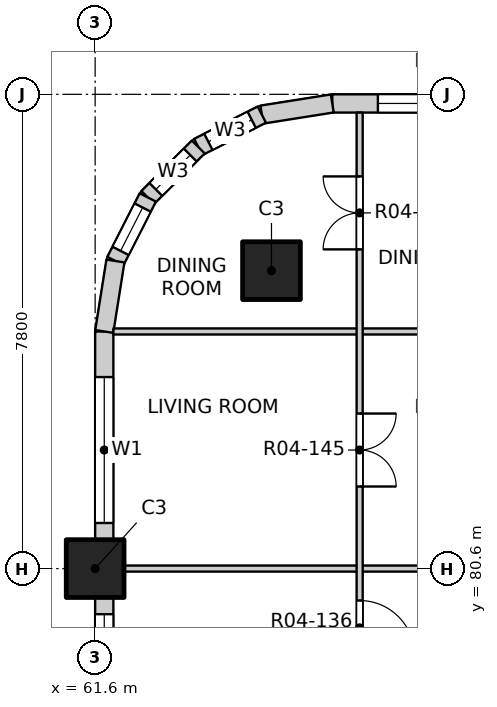
"""IFC4 building model, lengths in metres.
Left out: names, types, materials, properties, quantities, classifications, styles, units other than length and angle.
Written with IfcOpenShell. Run it as: python <this file> out.ifc"""

import sys

from ifc_helpers import new_model, si_unit, direction, frame, frame_2d, origin, origin_2d, place, context, subcontext, project, spatial, rectangle, extrude, element, fill, save


model = new_model("IFC4")
c1 = context("Model", 3, precision=1e-05, world=origin(), true_north=direction((0.0, 1.0)))
c2 = subcontext(c1, "Body", "Model", "MODEL_VIEW")
j1 = project(units=[si_unit("LENGTHUNIT", "METRE"), si_unit("PLANEANGLEUNIT", "RADIAN")], contexts=[c1])
p1 = place(None, origin())
s1 = spatial("IfcSite", under=j1, at=p1, CompositionType="ELEMENT")
p2 = place(p1, origin())
s2 = spatial("IfcBuilding", under=s1, at=p2, CompositionType="ELEMENT")
p3 = place(p2, frame((0.0, 0.0, 58.0)))
s3 = spatial("IfcBuildingStorey", under=s2, at=p3, CompositionType="ELEMENT", Elevation=58.0)
for number, where, z_axis, x_axis in (
    (1, (64.5, 85.5, -0.25), (0.0, 0.0, 1.0), (1.0, 0.0, 0.0)),
    (2, (61.6, 80.6, -0.25), (0.0, 0.0, 1.0), (1.0, 0.0, 0.0)),
):
    element("IfcColumn", number, at=place(p3, frame(where, z_axis=z_axis, x_axis=x_axis)), inside=s3, PredefinedType="COLUMN", context=c2, shape_type="SweptSolid", body=[
        extrude(rectangle(XDim=0.95, YDim=0.95, at=origin_2d()), origin(), (0.0, 0.0, 1.0), 3.4),
    ])
p4 = place(p3, frame((65.5, 88.25, 0.0), z_axis=(0.0, 0.0, 1.0), x_axis=(1.0, 0.0, 0.0)))
e3 = element("IfcWall", 3, at=p4, inside=s3, PredefinedType="SOLIDWALL", context=c2, shape_type="SweptSolid", body=[
    extrude(rectangle(XDim=3.425, YDim=0.3, at=frame_2d((1.712, 0.0))), origin(), (0.0, 0.0, 1.0), 2.7),
])
p5 = place(p4, frame((0.75, 0.0, 0.9)))
e4 = element("IfcOpeningElement", 4, at=p5, cuts=e3, PredefinedType="OPENING", context=c2, shape_type="SweptSolid", body=[
    extrude(rectangle(XDim=2.4, YDim=1.8, at=frame_2d((1.2, 0.9))), frame((0.0, 0.16, 0.0), z_axis=(0.0, -1.0, 0.0), x_axis=(1.0, 0.0, 0.0)), (0.0, 0.0, 1.0), 0.32),
])
p6 = place(p3, frame((61.75, 73.275, 0.0), z_axis=(0.0, 0.0, 1.0), x_axis=(0.0, 1.0, 0.0)))
e5 = element("IfcWall", 5, at=p6, inside=s3, PredefinedType="SOLIDWALL", context=c2, shape_type="SweptSolid", body=[
    extrude(rectangle(XDim=6.85, YDim=0.3, at=frame_2d((3.425, 0.0))), origin(), (0.0, 0.0, 1.0), 2.7),
])
p7 = place(p6, frame((0.275, 0.0, 0.9)))
e6 = element("IfcOpeningElement", 6, at=p7, cuts=e5, PredefinedType="OPENING", context=c2, shape_type="SweptSolid", body=[
    extrude(rectangle(XDim=2.4, YDim=1.8, at=frame_2d((1.2, 0.9))), frame((0.0, 0.16, 0.0), z_axis=(0.0, -1.0, 0.0), x_axis=(1.0, 0.0, 0.0)), (0.0, 0.0, 1.0), 0.32),
])
p8 = place(p6, frame((4.175, 0.0, 0.9)))
e7 = element("IfcOpeningElement", 7, at=p8, cuts=e5, PredefinedType="OPENING", context=c2, shape_type="SweptSolid", body=[
    extrude(rectangle(XDim=2.4, YDim=1.8, at=frame_2d((1.2, 0.9))), frame((0.0, 0.16, 0.0), z_axis=(0.0, -1.0, 0.0), x_axis=(1.0, 0.0, 0.0)), (0.0, 0.0, 1.0), 0.32),
])
p9 = place(p3, frame((61.75, 81.075, 0.0), z_axis=(0.0, 0.0, 1.0), x_axis=(0.0, 1.0, 0.0)))
e8 = element("IfcWall", 8, at=p9, inside=s3, PredefinedType="SOLIDWALL", context=c2, shape_type="SweptSolid", body=[
    extrude(rectangle(XDim=3.425, YDim=0.3, at=frame_2d((1.712, 0.0))), origin(), (0.0, 0.0, 1.0), 2.7),
])
p10 = place(p9, frame((0.275, 0.0, 0.9)))
e9 = element("IfcOpeningElement", 9, at=p10, cuts=e8, PredefinedType="OPENING", context=c2, shape_type="SweptSolid", body=[
    extrude(rectangle(XDim=2.4, YDim=1.8, at=frame_2d((1.2, 0.9))), frame((0.0, 0.16, 0.0), z_axis=(0.0, -1.0, 0.0), x_axis=(1.0, 0.0, 0.0)), (0.0, 0.0, 1.0), 0.32),
])
p11 = place(p3, frame((65.5, 88.25, 0.0), z_axis=(0.0, 0.0, 1.0), x_axis=(-0.987678452879, -0.156496880861, 0.0)))
e10 = element("IfcWall", 10, at=p11, inside=s3, PredefinedType="SOLIDWALL", context=c2, shape_type="SweptSolid", body=[
    extrude(rectangle(XDim=1.173, YDim=0.3, at=frame_2d((0.586, 0.0))), origin(), (0.0, 0.0, 1.0), 2.7),
])
p12 = place(p3, frame((64.341, 88.066, 0.0), z_axis=(0.0, 0.0, 1.0), x_axis=(-0.890988677504, -0.454025524128, 0.0)))
e11 = element("IfcWall", 11, at=p12, inside=s3, PredefinedType="SOLIDWALL", context=c2, shape_type="SweptSolid", body=[
    extrude(rectangle(XDim=1.173, YDim=0.3, at=frame_2d((0.587, 0.0))), origin(), (0.0, 0.0, 1.0), 2.7),
])
p13 = place(p12, frame((0.187, 0.0, 0.9)))
e12 = element("IfcOpeningElement", 12, at=p13, cuts=e11, PredefinedType="OPENING", context=c2, shape_type="SweptSolid", body=[
    extrude(rectangle(XDim=0.8, YDim=1.2, at=frame_2d((0.4, 0.6))), frame((0.0, 0.16, 0.0), z_axis=(0.0, -1.0, 0.0), x_axis=(1.0, 0.0, 0.0)), (0.0, 0.0, 1.0), 0.32),
])
p14 = place(p3, frame((63.296, 87.534, 0.0), z_axis=(0.0, 0.0, 1.0), x_axis=(-0.707106781187, -0.707106781187, 0.0)))
e13 = element("IfcWall", 13, at=p14, inside=s3, PredefinedType="SOLIDWALL", context=c2, shape_type="SweptSolid", body=[
    extrude(rectangle(XDim=1.173, YDim=0.3, at=frame_2d((0.586, 0.0))), origin(), (0.0, 0.0, 1.0), 2.7),
])
p15 = place(p14, frame((0.187, 0.0, 0.9)))
e14 = element("IfcOpeningElement", 14, at=p15, cuts=e13, PredefinedType="OPENING", context=c2, shape_type="SweptSolid", body=[
    extrude(rectangle(XDim=0.8, YDim=1.2, at=frame_2d((0.4, 0.6))), frame((0.0, 0.16, 0.0), z_axis=(0.0, -1.0, 0.0), x_axis=(1.0, 0.0, 0.0)), (0.0, 0.0, 1.0), 0.32),
])
p16 = place(p3, frame((62.466, 86.704, 0.0), z_axis=(0.0, 0.0, 1.0), x_axis=(-0.454025524128, -0.890988677504, 0.0)))
e15 = element("IfcWall", 15, at=p16, inside=s3, PredefinedType="SOLIDWALL", context=c2, shape_type="SweptSolid", body=[
    extrude(rectangle(XDim=1.173, YDim=0.3, at=frame_2d((0.587, 0.0))), origin(), (0.0, 0.0, 1.0), 2.7),
])
p17 = place(p16, frame((0.187, 0.0, 0.9)))
e16 = element("IfcOpeningElement", 16, at=p17, cuts=e15, PredefinedType="OPENING", context=c2, shape_type="SweptSolid", body=[
    extrude(rectangle(XDim=0.8, YDim=1.2, at=frame_2d((0.4, 0.6))), frame((0.0, 0.16, 0.0), z_axis=(0.0, -1.0, 0.0), x_axis=(1.0, 0.0, 0.0)), (0.0, 0.0, 1.0), 0.32),
])
p18 = place(p3, frame((61.934, 85.659, 0.0), z_axis=(0.0, 0.0, 1.0), x_axis=(-0.156496880861, -0.987678452879, 0.0)))
e17 = element("IfcWall", 17, at=p18, inside=s3, PredefinedType="SOLIDWALL", context=c2, shape_type="SweptSolid", body=[
    extrude(rectangle(XDim=1.173, YDim=0.3, at=frame_2d((0.586, 0.0))), origin(), (0.0, 0.0, 1.0), 2.7),
])
p19 = place(p3, frame((61.9, 80.6, 0.0), z_axis=(0.0, 0.0, 1.0), x_axis=(1.0, 0.0, 0.0)))
e18 = element("IfcWall", 18, at=p19, inside=s3, PredefinedType="PARTITIONING", context=c2, shape_type="SweptSolid", body=[
    extrude(rectangle(XDim=7.55, YDim=0.1, at=frame_2d((3.775, 0.0))), origin(), (0.0, 0.0, 1.0), 2.55),
])
p20 = place(p3, frame((61.9, 84.5, 0.0), z_axis=(0.0, 0.0, 1.0), x_axis=(1.0, 0.0, 0.0)))
e19 = element("IfcWall", 19, at=p20, inside=s3, PredefinedType="PARTITIONING", context=c2, shape_type="SweptSolid", body=[
    extrude(rectangle(XDim=11.5, YDim=0.1, at=frame_2d((5.75, 0.0))), origin(), (0.0, 0.0, 1.0), 3.15),
])
p21 = place(p20, frame((7.965, 0.0, 0.0)))
e20 = element("IfcOpeningElement", 20, at=p21, cuts=e19, PredefinedType="OPENING", context=c2, shape_type="SweptSolid", body=[
    extrude(rectangle(XDim=0.9, YDim=2.1, at=frame_2d((0.45, 1.05))), frame((0.0, 0.06, 0.0), z_axis=(0.0, -1.0, 0.0), x_axis=(1.0, 0.0, 0.0)), (0.0, 0.0, 1.0), 0.12),
])
p22 = place(p3, frame((65.95, 76.8, 0.0), z_axis=(0.0, 0.0, 1.0), x_axis=(0.0, 1.0, 0.0)))
e21 = element("IfcWall", 21, at=p22, inside=s3, PredefinedType="PARTITIONING", context=c2, shape_type="SweptSolid", body=[
    extrude(rectangle(XDim=11.3, YDim=0.1, at=frame_2d((5.65, 0.0))), origin(), (0.0, 0.0, 1.0), 3.15),
])
p23 = place(p22, frame((0.425, 0.0, 0.0)))
e22 = element("IfcOpeningElement", 22, at=p23, cuts=e21, PredefinedType="OPENING", context=c2, shape_type="SweptSolid", body=[
    extrude(rectangle(XDim=0.9, YDim=2.1, at=frame_2d((0.45, 1.05))), frame((0.0, 0.06, 0.0), z_axis=(0.0, -1.0, 0.0), x_axis=(1.0, 0.0, 0.0)), (0.0, 0.0, 1.0), 0.12),
])
p24 = place(p22, frame((2.375, 0.0, 0.0)))
e23 = element("IfcOpeningElement", 23, at=p24, cuts=e21, PredefinedType="OPENING", context=c2, shape_type="SweptSolid", body=[
    extrude(rectangle(XDim=0.9, YDim=2.1, at=frame_2d((0.45, 1.05))), frame((0.0, 0.06, 0.0), z_axis=(0.0, -1.0, 0.0), x_axis=(1.0, 0.0, 0.0)), (0.0, 0.0, 1.0), 0.12),
])
p25 = place(p22, frame((5.15, 0.0, 0.0)))
e24 = element("IfcOpeningElement", 24, at=p25, cuts=e21, PredefinedType="OPENING", context=c2, shape_type="SweptSolid", body=[
    extrude(rectangle(XDim=1.2, YDim=2.1, at=frame_2d((0.6, 1.05))), frame((0.0, 0.06, 0.0), z_axis=(0.0, -1.0, 0.0), x_axis=(1.0, 0.0, 0.0)), (0.0, 0.0, 1.0), 0.12),
])
p26 = place(p22, frame((9.05, 0.0, 0.0)))
e25 = element("IfcOpeningElement", 25, at=p26, cuts=e21, PredefinedType="OPENING", context=c2, shape_type="SweptSolid", body=[
    extrude(rectangle(XDim=1.2, YDim=2.1, at=frame_2d((0.6, 1.05))), frame((0.0, 0.06, 0.0), z_axis=(0.0, -1.0, 0.0), x_axis=(1.0, 0.0, 0.0)), (0.0, 0.0, 1.0), 0.12),
])
p27 = place(p5, origin())
e26 = element("IfcWindow", 26, at=p27, inside=s3, PartitioningType="DOUBLE_PANEL_VERTICAL", PredefinedType="WINDOW", context=c2, shape_type="SweptSolid", body=[
    extrude(rectangle(XDim=2.4, YDim=1.8, at=frame_2d((1.2, 0.9))), frame((0.0, 0.03, 0.0), z_axis=(0.0, -1.0, 0.0), x_axis=(1.0, 0.0, 0.0)), (0.0, 0.0, 1.0), 0.06),
])
fill(e4, e26)
p28 = place(p8, origin())
e27 = element("IfcWindow", 27, at=p28, inside=s3, PartitioningType="DOUBLE_PANEL_VERTICAL", PredefinedType="WINDOW", context=c2, shape_type="SweptSolid", body=[
    extrude(rectangle(XDim=2.4, YDim=1.8, at=frame_2d((1.2, 0.9))), frame((0.0, 0.03, 0.0), z_axis=(0.0, -1.0, 0.0), x_axis=(1.0, 0.0, 0.0)), (0.0, 0.0, 1.0), 0.06),
])
fill(e7, e27)
p29 = place(p10, origin())
e28 = element("IfcWindow", 28, at=p29, inside=s3, PartitioningType="DOUBLE_PANEL_VERTICAL", PredefinedType="WINDOW", context=c2, shape_type="SweptSolid", body=[
    extrude(rectangle(XDim=2.4, YDim=1.8, at=frame_2d((1.2, 0.9))), frame((0.0, 0.03, 0.0), z_axis=(0.0, -1.0, 0.0), x_axis=(1.0, 0.0, 0.0)), (0.0, 0.0, 1.0), 0.06),
])
fill(e9, e28)
p30 = place(p13, origin())
e29 = element("IfcWindow", 29, at=p30, inside=s3, PartitioningType="SINGLE_PANEL", PredefinedType="WINDOW", context=c2, shape_type="SweptSolid", body=[
    extrude(rectangle(XDim=0.8, YDim=1.2, at=frame_2d((0.4, 0.6))), frame((0.0, 0.03, 0.0), z_axis=(0.0, -1.0, 0.0), x_axis=(1.0, 0.0, 0.0)), (0.0, 0.0, 1.0), 0.06),
])
fill(e12, e29)
p31 = place(p15, origin())
e30 = element("IfcWindow", 30, at=p31, inside=s3, PartitioningType="SINGLE_PANEL", PredefinedType="WINDOW", context=c2, shape_type="SweptSolid", body=[
    extrude(rectangle(XDim=0.8, YDim=1.2, at=frame_2d((0.4, 0.6))), frame((0.0, 0.03, 0.0), z_axis=(0.0, -1.0, 0.0), x_axis=(1.0, 0.0, 0.0)), (0.0, 0.0, 1.0), 0.06),
])
fill(e14, e30)
p32 = place(p17, origin())
e31 = element("IfcWindow", 31, at=p32, inside=s3, PartitioningType="SINGLE_PANEL", PredefinedType="WINDOW", context=c2, shape_type="SweptSolid", body=[
    extrude(rectangle(XDim=0.8, YDim=1.2, at=frame_2d((0.4, 0.6))), frame((0.0, 0.03, 0.0), z_axis=(0.0, -1.0, 0.0), x_axis=(1.0, 0.0, 0.0)), (0.0, 0.0, 1.0), 0.06),
])
fill(e16, e31)
p33 = place(p24, origin())
e32 = element("IfcDoor", 32, at=p33, inside=s3, OperationType="SINGLE_SWING_RIGHT", PredefinedType="DOOR", context=c2, shape_type="SweptSolid", body=[
    extrude(rectangle(XDim=0.9, YDim=2.1, at=frame_2d((0.45, 1.05))), frame((0.0, 0.025, 0.0), z_axis=(0.0, -1.0, 0.0), x_axis=(1.0, 0.0, 0.0)), (0.0, 0.0, 1.0), 0.05),
])
fill(e23, e32)
p34 = place(p25, origin())
e33 = element("IfcDoor", 33, at=p34, inside=s3, OperationType="DOUBLE_DOOR_SINGLE_SWING", PredefinedType="DOOR", context=c2, shape_type="SweptSolid", body=[
    extrude(rectangle(XDim=1.2, YDim=2.1, at=frame_2d((0.6, 1.05))), frame((0.0, 0.025, 0.0), z_axis=(0.0, -1.0, 0.0), x_axis=(1.0, 0.0, 0.0)), (0.0, 0.0, 1.0), 0.05),
])
fill(e24, e33)
p35 = place(p26, origin())
e34 = element("IfcDoor", 34, at=p35, inside=s3, OperationType="DOUBLE_DOOR_SINGLE_SWING", PredefinedType="DOOR", context=c2, shape_type="SweptSolid", body=[
    extrude(rectangle(XDim=1.2, YDim=2.1, at=frame_2d((0.6, 1.05))), frame((0.0, 0.025, 0.0), z_axis=(0.0, -1.0, 0.0), x_axis=(1.0, 0.0, 0.0)), (0.0, 0.0, 1.0), 0.05),
])
fill(e25, e34)
save(model, sys.argv[1])
